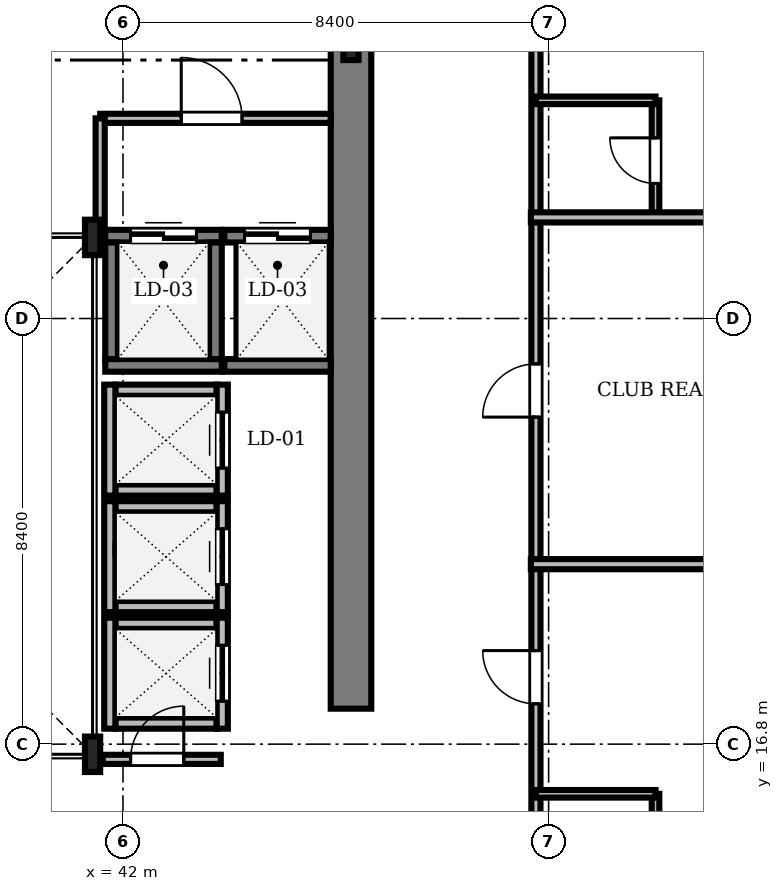
"""IFC4 building model, lengths in metres.
Left out: names, types, materials, properties, quantities, classifications, styles, units other than length and angle.
Written with IfcOpenShell. Run it as: python <this file> out.ifc"""

import sys

from ifc_helpers import new_model, si_unit, direction, frame, frame_2d, origin, origin_2d, place, context, subcontext, project, spatial, rectangle, i_section, extrude, source, transform, mapped, element, fill, save


model = new_model("IFC4")
c1 = context("Model", 3, precision=1e-05, world=origin(), true_north=direction((0.0, 1.0)))
c2 = subcontext(c1, "Body", "Model", "MODEL_VIEW")
j1 = project(units=[si_unit("LENGTHUNIT", "METRE"), si_unit("PLANEANGLEUNIT", "RADIAN")], contexts=[c1])
p1 = place(None, origin())
s1 = spatial("IfcSite", under=j1, at=p1, CompositionType="ELEMENT")
p2 = place(p1, origin())
s2 = spatial("IfcBuilding", under=s1, at=p2, CompositionType="ELEMENT")
p3 = place(p2, frame((0.0, 0.0, 214.8)))
s3 = spatial("IfcBuildingStorey", under=s2, at=p3, CompositionType="ELEMENT", Elevation=214.8)
m1 = source(origin(), c2, "Body", "SweptSolid", [
    extrude(rectangle(XDim=13.15, YDim=0.8, at=frame_2d((6.575, 0.0))), origin(), (0.0, 0.0, 1.0), 3.53),
])
p4 = place(p3, frame((46.5, 17.5, 0.0), z_axis=(0.0, 0.0, 1.0), x_axis=(0.0, 1.0, 0.0)))
e1 = element("IfcWall", 1, at=p4, inside=s3, PredefinedType="SHEAR", context=c2, shape_type="MappedRepresentation", body=[
    mapped(m1, transform((0.0, 0.0, 0.0), scale=1.0)),
])
m2 = source(origin(), c2, "Body", "SweptSolid", [
    extrude(i_section(OverallWidth=0.3, OverallDepth=0.7, WebThickness=0.017, FlangeThickness=0.032, FilletRadius=0.027, at=origin_2d()), origin(), (0.0, 0.0, 1.0), 3.53),
])
for number, where, z_axis, x_axis in (
    (2, (41.4, 16.6, 0.0), (0.0, 0.0, 1.0), (1.0, 0.0, 0.0)),
    (3, (41.4, 26.8, 0.0), (0.0, 0.0, 1.0), (1.0, 0.0, 0.0)),
    (4, (46.5, 30.65, 0.0), (0.0, 0.0, 1.0), (1.0, 0.0, 0.0)),
):
    element("IfcColumn", number, at=place(p3, frame(where, z_axis=z_axis, x_axis=x_axis)), inside=s3, PredefinedType="COLUMN", context=c2, shape_type="MappedRepresentation", body=[
        mapped(m2, transform((0.0, 0.0, 0.0), scale=1.0)),
    ])
m3 = source(origin(), c2, "Body", "SweptSolid", [
    extrude(rectangle(XDim=2.0, YDim=0.22, at=frame_2d((1.0, 0.0))), origin(), (0.0, 0.0, 1.0), 3.53),
])
for number, where, z_axis, x_axis in (
    (5, (41.85, 21.815, 0.0), (0.0, 0.0, 1.0), (1.0, 0.0, 0.0)),
    (6, (41.85, 23.785, 0.0), (0.0, 0.0, 1.0), (1.0, 0.0, 0.0)),
):
    element("IfcWall", number, at=place(p3, frame(where, z_axis=z_axis, x_axis=x_axis)), inside=s3, PredefinedType="SOLIDWALL", context=c2, shape_type="MappedRepresentation", body=[
        mapped(m3, transform((0.0, 0.0, 0.0), scale=1.0)),
    ])
m4 = source(origin(), c2, "Body", "SweptSolid", [
    extrude(rectangle(XDim=2.19, YDim=0.22, at=frame_2d((1.095, 0.0))), origin(), (0.0, 0.0, 1.0), 3.53),
])
p5 = place(p3, frame((41.74, 21.705, 0.0), z_axis=(0.0, 0.0, 1.0), x_axis=(0.0, 1.0, 0.0)))
e7 = element("IfcWall", 7, at=p5, inside=s3, PredefinedType="SOLIDWALL", context=c2, shape_type="MappedRepresentation", body=[
    mapped(m4, transform((0.0, 0.0, 0.0), scale=1.0)),
])
p6 = place(p3, frame((43.96, 21.705, 0.0), z_axis=(0.0, 0.0, 1.0), x_axis=(0.0, 1.0, 0.0)))
e8 = element("IfcWall", 8, at=p6, inside=s3, PredefinedType="SOLIDWALL", context=c2, shape_type="MappedRepresentation", body=[
    mapped(m4, transform((0.0, 0.0, 0.0), scale=1.0)),
])
m5 = source(origin(), c2, "Body", "SweptSolid", [
    extrude(rectangle(XDim=1.1, YDim=2.2, at=frame_2d((0.55, 1.1))), frame((0.0, 0.12, 0.0), z_axis=(0.0, -1.0, 0.0), x_axis=(1.0, 0.0, 0.0)), (0.0, 0.0, 1.0), 0.24),
])
p7 = place(p6, frame((0.545, 0.0, 0.0)))
e9 = element("IfcOpeningElement", 9, at=p7, cuts=e8, PredefinedType="OPENING", context=c2, shape_type="MappedRepresentation", body=[
    mapped(m5, transform((0.0, 0.0, 0.0), scale=1.0)),
])
for number, where, z_axis, x_axis in (
    (10, (41.85, 19.515, 0.0), (0.0, 0.0, 1.0), (1.0, 0.0, 0.0)),
    (11, (41.85, 21.485, 0.0), (0.0, 0.0, 1.0), (1.0, 0.0, 0.0)),
):
    element("IfcWall", number, at=place(p3, frame(where, z_axis=z_axis, x_axis=x_axis)), inside=s3, PredefinedType="SOLIDWALL", context=c2, shape_type="MappedRepresentation", body=[
        mapped(m3, transform((0.0, 0.0, 0.0), scale=1.0)),
    ])
p8 = place(p3, frame((41.74, 19.405, 0.0), z_axis=(0.0, 0.0, 1.0), x_axis=(0.0, 1.0, 0.0)))
e12 = element("IfcWall", 12, at=p8, inside=s3, PredefinedType="SOLIDWALL", context=c2, shape_type="MappedRepresentation", body=[
    mapped(m4, transform((0.0, 0.0, 0.0), scale=1.0)),
])
p9 = place(p3, frame((43.96, 19.405, 0.0), z_axis=(0.0, 0.0, 1.0), x_axis=(0.0, 1.0, 0.0)))
e13 = element("IfcWall", 13, at=p9, inside=s3, PredefinedType="SOLIDWALL", context=c2, shape_type="MappedRepresentation", body=[
    mapped(m4, transform((0.0, 0.0, 0.0), scale=1.0)),
])
p10 = place(p9, frame((0.545, 0.0, 0.0)))
e14 = element("IfcOpeningElement", 14, at=p10, cuts=e13, PredefinedType="OPENING", context=c2, shape_type="MappedRepresentation", body=[
    mapped(m5, transform((0.0, 0.0, 0.0), scale=1.0)),
])
for number, where, z_axis, x_axis in (
    (15, (41.85, 17.215, 0.0), (0.0, 0.0, 1.0), (1.0, 0.0, 0.0)),
    (16, (41.85, 19.185, 0.0), (0.0, 0.0, 1.0), (1.0, 0.0, 0.0)),
):
    element("IfcWall", number, at=place(p3, frame(where, z_axis=z_axis, x_axis=x_axis)), inside=s3, PredefinedType="SOLIDWALL", context=c2, shape_type="MappedRepresentation", body=[
        mapped(m3, transform((0.0, 0.0, 0.0), scale=1.0)),
    ])
p11 = place(p3, frame((41.74, 17.105, 0.0), z_axis=(0.0, 0.0, 1.0), x_axis=(0.0, 1.0, 0.0)))
e17 = element("IfcWall", 17, at=p11, inside=s3, PredefinedType="SOLIDWALL", context=c2, shape_type="MappedRepresentation", body=[
    mapped(m4, transform((0.0, 0.0, 0.0), scale=1.0)),
])
p12 = place(p3, frame((43.96, 17.105, 0.0), z_axis=(0.0, 0.0, 1.0), x_axis=(0.0, 1.0, 0.0)))
e18 = element("IfcWall", 18, at=p12, inside=s3, PredefinedType="SOLIDWALL", context=c2, shape_type="MappedRepresentation", body=[
    mapped(m4, transform((0.0, 0.0, 0.0), scale=1.0)),
])
p13 = place(p12, frame((0.545, 0.0, 0.0)))
e19 = element("IfcOpeningElement", 19, at=p13, cuts=e18, PredefinedType="OPENING", context=c2, shape_type="MappedRepresentation", body=[
    mapped(m5, transform((0.0, 0.0, 0.0), scale=1.0)),
])
m6 = source(origin(), c2, "Body", "SweptSolid", [
    extrude(rectangle(XDim=2.3, YDim=0.25, at=frame_2d((1.15, 0.0))), origin(), (0.0, 0.0, 1.0), 3.53),
])
p14 = place(p3, frame((41.65, 24.275, 0.0), z_axis=(0.0, 0.0, 1.0), x_axis=(1.0, 0.0, 0.0)))
e20 = element("IfcWall", 20, at=p14, inside=s3, PredefinedType="SOLIDWALL", context=c2, shape_type="MappedRepresentation", body=[
    mapped(m6, transform((0.0, 0.0, 0.0), scale=1.0)),
])
p15 = place(p3, frame((41.65, 26.825, 0.0), z_axis=(0.0, 0.0, 1.0), x_axis=(1.0, 0.0, 0.0)))
e21 = element("IfcWall", 21, at=p15, inside=s3, PredefinedType="SOLIDWALL", context=c2, shape_type="MappedRepresentation", body=[
    mapped(m6, transform((0.0, 0.0, 0.0), scale=1.0)),
])
m7 = source(origin(), c2, "Body", "SweptSolid", [
    extrude(rectangle(XDim=1.3, YDim=2.3, at=frame_2d((0.65, 1.15))), frame((0.0, 0.135, 0.0), z_axis=(0.0, -1.0, 0.0), x_axis=(1.0, 0.0, 0.0)), (0.0, 0.0, 1.0), 0.27),
])
p16 = place(p15, frame((0.5, 0.0, 0.0)))
e22 = element("IfcOpeningElement", 22, at=p16, cuts=e21, PredefinedType="OPENING", context=c2, shape_type="MappedRepresentation", body=[
    mapped(m7, transform((0.0, 0.0, 0.0), scale=1.0)),
])
for number, where, z_axis, x_axis in (
    (23, (41.775, 24.4, 0.0), (0.0, 0.0, 1.0), (0.0, 1.0, 0.0)),
    (24, (43.825, 24.4, 0.0), (0.0, 0.0, 1.0), (0.0, 1.0, 0.0)),
):
    element("IfcWall", number, at=place(p3, frame(where, z_axis=z_axis, x_axis=x_axis)), inside=s3, PredefinedType="SOLIDWALL", context=c2, shape_type="MappedRepresentation", body=[
        mapped(m6, transform((0.0, 0.0, 0.0), scale=1.0)),
    ])
m8 = source(origin(), c2, "Body", "SweptSolid", [
    extrude(rectangle(XDim=2.1, YDim=0.25, at=frame_2d((1.05, 0.0))), origin(), (0.0, 0.0, 1.0), 3.53),
])
p17 = place(p3, frame((44.0, 24.275, 0.0), z_axis=(0.0, 0.0, 1.0), x_axis=(1.0, 0.0, 0.0)))
e25 = element("IfcWall", 25, at=p17, inside=s3, PredefinedType="SOLIDWALL", context=c2, shape_type="MappedRepresentation", body=[
    mapped(m8, transform((0.0, 0.0, 0.0), scale=1.0)),
])
p18 = place(p3, frame((44.0, 26.825, 0.0), z_axis=(0.0, 0.0, 1.0), x_axis=(1.0, 0.0, 0.0)))
e26 = element("IfcWall", 26, at=p18, inside=s3, PredefinedType="SOLIDWALL", context=c2, shape_type="MappedRepresentation", body=[
    mapped(m8, transform((0.0, 0.0, 0.0), scale=1.0)),
])
p19 = place(p18, frame((0.4, 0.0, 0.0)))
e27 = element("IfcOpeningElement", 27, at=p19, cuts=e26, PredefinedType="OPENING", context=c2, shape_type="MappedRepresentation", body=[
    mapped(m7, transform((0.0, 0.0, 0.0), scale=1.0)),
])
m9 = source(origin(), c2, "Body", "SweptSolid", [
    extrude(rectangle(XDim=27.59, YDim=0.18, at=frame_2d((13.795, 0.0))), origin(), (0.0, 0.0, 1.0), 2.972),
])
p20 = place(p3, frame((50.15, 13.51, 0.0), z_axis=(0.0, 0.0, 1.0), x_axis=(0.0, 1.0, 0.0)))
e28 = element("IfcWall", 28, at=p20, inside=s3, PredefinedType="PARTITIONING", context=c2, shape_type="MappedRepresentation", body=[
    mapped(m9, transform((0.0, 0.0, 0.0), scale=1.0)),
])
m10 = source(origin(), c2, "Body", "SweptSolid", [
    extrude(rectangle(XDim=1.05, YDim=2.2, at=frame_2d((0.525, 1.1))), frame((0.0, 0.1, 0.0), z_axis=(0.0, -1.0, 0.0), x_axis=(1.0, 0.0, 0.0)), (0.0, 0.0, 1.0), 0.2),
])
p21 = place(p20, frame((4.086, 0.0, 0.0)))
e29 = element("IfcOpeningElement", 29, at=p21, cuts=e28, PredefinedType="OPENING", context=c2, shape_type="MappedRepresentation", body=[
    mapped(m10, transform((0.0, 0.0, 0.0), scale=1.0)),
])
p22 = place(p20, frame((9.744, 0.0, 0.0)))
e30 = element("IfcOpeningElement", 30, at=p22, cuts=e28, PredefinedType="OPENING", context=c2, shape_type="MappedRepresentation", body=[
    mapped(m10, transform((0.0, 0.0, 0.0), scale=1.0)),
])
p23 = place(p20, frame((17.771, 0.0, 0.0)))
e31 = element("IfcOpeningElement", 31, at=p23, cuts=e28, PredefinedType="OPENING", context=c2, shape_type="MappedRepresentation", body=[
    mapped(m10, transform((0.0, 0.0, 0.0), scale=1.0)),
])
p24 = place(p20, frame((24.614, 0.0, 0.0)))
e32 = element("IfcOpeningElement", 32, at=p24, cuts=e28, PredefinedType="OPENING", context=c2, shape_type="MappedRepresentation", body=[
    mapped(m10, transform((0.0, 0.0, 0.0), scale=1.0)),
])
m11 = source(origin(), c2, "Body", "SweptSolid", [
    extrude(rectangle(XDim=4.548, YDim=0.18, at=frame_2d((2.274, 0.0))), origin(), (0.0, 0.0, 1.0), 3.162),
])
p25 = place(p3, frame((41.55, 29.15, 0.0), z_axis=(0.0, 0.0, 1.0), x_axis=(1.0, 0.0, 0.0)))
e33 = element("IfcWall", 33, at=p25, inside=s3, PredefinedType="PARTITIONING", context=c2, shape_type="MappedRepresentation", body=[
    mapped(m11, transform((0.0, 0.0, 0.0), scale=1.0)),
])
m12 = source(origin(), c2, "Body", "SweptSolid", [
    extrude(rectangle(XDim=1.2, YDim=2.2, at=frame_2d((0.6, 1.1))), frame((0.0, 0.1, 0.0), z_axis=(0.0, -1.0, 0.0), x_axis=(1.0, 0.0, 0.0)), (0.0, 0.0, 1.0), 0.2),
])
p26 = place(p25, frame((1.6, 0.0, 0.0)))
e34 = element("IfcOpeningElement", 34, at=p26, cuts=e33, PredefinedType="OPENING", context=c2, shape_type="MappedRepresentation", body=[
    mapped(m12, transform((0.0, 0.0, 0.0), scale=1.0)),
])
m13 = source(origin(), c2, "Body", "SweptSolid", [
    extrude(rectangle(XDim=2.33, YDim=0.18, at=frame_2d((1.165, 0.0))), origin(), (0.0, 0.0, 1.0), 2.972),
])
p27 = place(p3, frame((41.6, 16.5, 0.0), z_axis=(0.0, 0.0, 1.0), x_axis=(1.0, 0.0, 0.0)))
e35 = element("IfcWall", 35, at=p27, inside=s3, PredefinedType="PARTITIONING", context=c2, shape_type="MappedRepresentation", body=[
    mapped(m13, transform((0.0, 0.0, 0.0), scale=1.0)),
])
p28 = place(p27, frame((0.55, 0.0, 0.0)))
e36 = element("IfcOpeningElement", 36, at=p28, cuts=e35, PredefinedType="OPENING", context=c2, shape_type="MappedRepresentation", body=[
    mapped(m10, transform((0.0, 0.0, 0.0), scale=1.0)),
])
m14 = source(origin(), c2, "Body", "SweptSolid", [
    extrude(rectangle(XDim=2.29, YDim=0.15, at=frame_2d((1.145, 0.0))), origin(), (0.0, 0.0, 1.0), 2.972),
])
p29 = place(p3, frame((52.51, 13.53, 0.0), z_axis=(0.0, 0.0, 1.0), x_axis=(0.0, 1.0, 0.0)))
e37 = element("IfcWall", 37, at=p29, inside=s3, PredefinedType="PARTITIONING", context=c2, shape_type="MappedRepresentation", body=[
    mapped(m14, transform((0.0, 0.0, 0.0), scale=1.0)),
])
m15 = source(origin(), c2, "Body", "SweptSolid", [
    extrude(rectangle(XDim=0.9, YDim=2.1, at=frame_2d((0.45, 1.05))), frame((0.0, 0.085, 0.0), z_axis=(0.0, -1.0, 0.0), x_axis=(1.0, 0.0, 0.0)), (0.0, 0.0, 1.0), 0.17),
])
p30 = place(p29, frame((0.65, 0.0, 0.0)))
e38 = element("IfcOpeningElement", 38, at=p30, cuts=e37, PredefinedType="OPENING", context=c2, shape_type="MappedRepresentation", body=[
    mapped(m15, transform((0.0, 0.0, 0.0), scale=1.0)),
])
m16 = source(origin(), c2, "Body", "SweptSolid", [
    extrude(rectangle(XDim=2.29, YDim=0.15, at=frame_2d((1.145, 0.0))), origin(), (0.0, 0.0, 1.0), 2.972),
])
p31 = place(p3, frame((52.51, 27.215, 0.0), z_axis=(0.0, 0.0, 1.0), x_axis=(0.0, 1.0, 0.0)))
e39 = element("IfcWall", 39, at=p31, inside=s3, PredefinedType="PARTITIONING", context=c2, shape_type="MappedRepresentation", body=[
    mapped(m16, transform((0.0, 0.0, 0.0), scale=1.0)),
])
p32 = place(p31, frame((0.65, 0.0, 0.0)))
e40 = element("IfcOpeningElement", 40, at=p32, cuts=e39, PredefinedType="OPENING", context=c2, shape_type="MappedRepresentation", body=[
    mapped(m15, transform((0.0, 0.0, 0.0), scale=1.0)),
])
m17 = source(origin(), c2, "Body", "SweptSolid", [
    extrude(rectangle(XDim=7.528, YDim=0.2, at=frame_2d((3.764, 0.0))), origin(), (0.0, 0.0, 1.0), 2.772),
])
p33 = place(p3, frame((50.05, 20.352, 0.0), z_axis=(0.0, 0.0, 1.0), x_axis=(1.0, 0.0, 0.0)))
e41 = element("IfcWall", 41, at=p33, inside=s3, PredefinedType="PARTITIONING", context=c2, shape_type="MappedRepresentation", body=[
    mapped(m17, transform((0.0, 0.0, 0.0), scale=1.0)),
])
m18 = source(origin(), c2, "Body", "SweptSolid", [
    extrude(rectangle(XDim=7.72, YDim=0.2, at=frame_2d((3.86, 0.0))), origin(), (0.0, 0.0, 1.0), 2.772),
])
p34 = place(p3, frame((50.05, 27.195, 0.0), z_axis=(0.0, 0.0, 1.0), x_axis=(1.0, 0.0, 0.0)))
e42 = element("IfcWall", 42, at=p34, inside=s3, PredefinedType="PARTITIONING", context=c2, shape_type="MappedRepresentation", body=[
    mapped(m18, transform((0.0, 0.0, 0.0), scale=1.0)),
])
m19 = source(origin(), c2, "Body", "SweptSolid", [
    extrude(rectangle(XDim=2.36, YDim=0.15, at=frame_2d((1.18, 0.0))), origin(), (0.0, 0.0, 1.0), 3.53),
])
for number, where, z_axis, x_axis in (
    (43, (50.15, 15.82, 0.0), (0.0, 0.0, 1.0), (1.0, 0.0, 0.0)),
    (44, (50.15, 29.505, 0.0), (0.0, 0.0, 1.0), (1.0, 0.0, 0.0)),
):
    element("IfcWall", number, at=place(p3, frame(where, z_axis=z_axis, x_axis=x_axis)), inside=s3, PredefinedType="PARTITIONING", context=c2, shape_type="MappedRepresentation", body=[
        mapped(m19, transform((0.0, 0.0, 0.0), scale=1.0)),
    ])
m20 = source(origin(), c2, "Body", "SweptSolid", [
    extrude(rectangle(XDim=2.35, YDim=0.18, at=frame_2d((1.175, 0.0))), origin(), (0.0, 0.0, 1.0), 2.972),
])
p35 = place(p3, frame((41.55, 26.8, 0.0), z_axis=(0.0, 0.0, 1.0), x_axis=(0.0, 1.0, 0.0)))
e45 = element("IfcWall", 45, at=p35, inside=s3, PredefinedType="PARTITIONING", context=c2, shape_type="MappedRepresentation", body=[
    mapped(m20, transform((0.0, 0.0, 0.0), scale=1.0)),
])
m21 = source(origin(), c2, "Body", "SweptSolid", [
    extrude(rectangle(XDim=1.858, YDim=0.18, at=frame_2d((0.929, 0.0))), origin(), (0.0, 0.0, 1.0), 3.53),
])
p36 = place(p3, frame((41.852, 20.65, 0.0), z_axis=(0.0, 0.0, 1.0), x_axis=(1.0, 0.0, 0.0)))
e46 = element("IfcWall", 46, at=p36, inside=s3, PredefinedType="PARTITIONING", context=c2, shape_type="MappedRepresentation", body=[
    mapped(m21, transform((0.0, 0.0, 0.0), scale=1.0)),
])
m22 = source(origin(), c2, "Body", "SweptSolid", [
    extrude(rectangle(XDim=1.1, YDim=2.2, at=frame_2d((0.55, 1.1))), frame((0.0, 0.025, 0.0), z_axis=(0.0, -1.0, 0.0), x_axis=(1.0, 0.0, 0.0)), (0.0, 0.0, 1.0), 0.05),
])
p37 = place(p7, origin())
e47 = element("IfcDoor", 47, at=p37, inside=s3, OperationType="DOUBLE_DOOR_SLIDING", PredefinedType="DOOR", context=c2, shape_type="MappedRepresentation", body=[
    mapped(m22, transform((0.0, 0.0, 0.0), scale=1.0)),
])
fill(e9, e47)
p38 = place(p10, origin())
e48 = element("IfcDoor", 48, at=p38, inside=s3, OperationType="DOUBLE_DOOR_SLIDING", PredefinedType="DOOR", context=c2, shape_type="MappedRepresentation", body=[
    mapped(m22, transform((0.0, 0.0, 0.0), scale=1.0)),
])
fill(e14, e48)
p39 = place(p13, origin())
e49 = element("IfcDoor", 49, at=p39, inside=s3, OperationType="DOUBLE_DOOR_SLIDING", PredefinedType="DOOR", context=c2, shape_type="MappedRepresentation", body=[
    mapped(m22, transform((0.0, 0.0, 0.0), scale=1.0)),
])
fill(e19, e49)
m23 = source(origin(), c2, "Body", "SweptSolid", [
    extrude(rectangle(XDim=1.3, YDim=2.3, at=frame_2d((0.65, 1.15))), frame((0.0, 0.025, 0.0), z_axis=(0.0, -1.0, 0.0), x_axis=(1.0, 0.0, 0.0)), (0.0, 0.0, 1.0), 0.05),
])
p40 = place(p16, origin())
e50 = element("IfcDoor", 50, at=p40, inside=s3, OperationType="DOUBLE_DOOR_SLIDING", PredefinedType="DOOR", context=c2, shape_type="MappedRepresentation", body=[
    mapped(m23, transform((0.0, 0.0, 0.0), scale=1.0)),
])
fill(e22, e50)
p41 = place(p19, origin())
e51 = element("IfcDoor", 51, at=p41, inside=s3, OperationType="DOUBLE_DOOR_SLIDING", PredefinedType="DOOR", context=c2, shape_type="MappedRepresentation", body=[
    mapped(m23, transform((0.0, 0.0, 0.0), scale=1.0)),
])
fill(e27, e51)
m24 = source(origin(), c2, "Body", "SweptSolid", [
    extrude(rectangle(XDim=1.05, YDim=2.2, at=frame_2d((0.525, 1.1))), frame((0.0, 0.025, 0.0), z_axis=(0.0, -1.0, 0.0), x_axis=(1.0, 0.0, 0.0)), (0.0, 0.0, 1.0), 0.05),
])
p42 = place(p21, origin())
e52 = element("IfcDoor", 52, at=p42, inside=s3, OperationType="SINGLE_SWING_RIGHT", PredefinedType="DOOR", context=c2, shape_type="MappedRepresentation", body=[
    mapped(m24, transform((0.0, 0.0, 0.0), scale=1.0)),
])
fill(e29, e52)
p43 = place(p22, origin())
e53 = element("IfcDoor", 53, at=p43, inside=s3, OperationType="SINGLE_SWING_LEFT", PredefinedType="DOOR", context=c2, shape_type="MappedRepresentation", body=[
    mapped(m24, transform((0.0, 0.0, 0.0), scale=1.0)),
])
fill(e30, e53)
m25 = source(origin(), c2, "Body", "SweptSolid", [
    extrude(rectangle(XDim=1.2, YDim=2.2, at=frame_2d((0.6, 1.1))), frame((0.0, 0.025, 0.0), z_axis=(0.0, -1.0, 0.0), x_axis=(1.0, 0.0, 0.0)), (0.0, 0.0, 1.0), 0.05),
])
p44 = place(p26, origin())
e54 = element("IfcDoor", 54, at=p44, inside=s3, OperationType="SINGLE_SWING_LEFT", PredefinedType="DOOR", context=c2, shape_type="MappedRepresentation", body=[
    mapped(m25, transform((0.0, 0.0, 0.0), scale=1.0)),
])
fill(e34, e54)
p45 = place(p28, origin())
e55 = element("IfcDoor", 55, at=p45, inside=s3, OperationType="SINGLE_SWING_RIGHT", PredefinedType="DOOR", context=c2, shape_type="MappedRepresentation", body=[
    mapped(m24, transform((0.0, 0.0, 0.0), scale=1.0)),
])
fill(e36, e55)
m26 = source(origin(), c2, "Body", "SweptSolid", [
    extrude(rectangle(XDim=0.9, YDim=2.1, at=frame_2d((0.45, 1.05))), frame((0.0, 0.025, 0.0), z_axis=(0.0, -1.0, 0.0), x_axis=(1.0, 0.0, 0.0)), (0.0, 0.0, 1.0), 0.05),
])
p46 = place(p32, origin())
e56 = element("IfcDoor", 56, at=p46, inside=s3, OperationType="SINGLE_SWING_RIGHT", PredefinedType="DOOR", context=c2, shape_type="MappedRepresentation", body=[
    mapped(m26, transform((0.0, 0.0, 0.0), scale=1.0)),
])
fill(e40, e56)
save(model, sys.argv[1])
